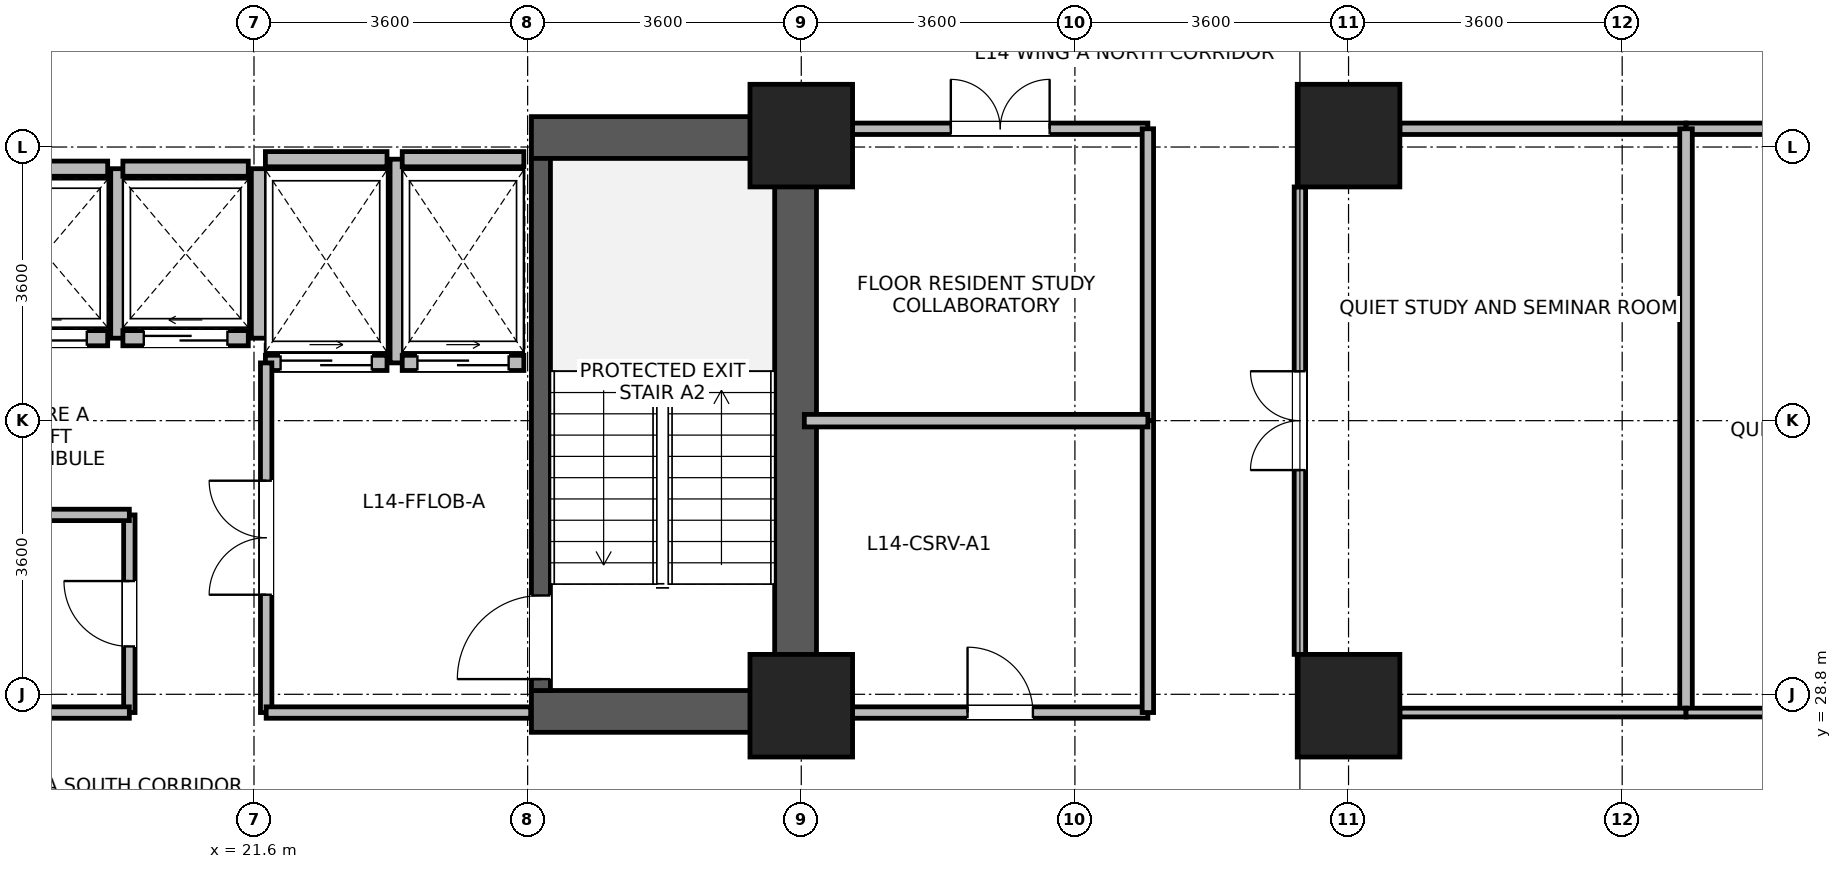
"""IFC4 building model, lengths in metres.
Left out: names, types, materials, properties, quantities, classifications, styles, units other than length and angle.
Written with IfcOpenShell. Run it as: python <this file> out.ifc"""

import sys

from ifc_helpers import new_model, si_unit, direction, frame, frame_2d, origin, origin_2d, place, context, subcontext, project, spatial, rectangle, extrude, source, transform, mapped, element, fill, save


model = new_model("IFC4")
c1 = context("Model", 3, precision=1e-05, world=origin(), true_north=direction((0.0, 1.0)))
c2 = subcontext(c1, "Body", "Model", "MODEL_VIEW")
j1 = project(units=[si_unit("LENGTHUNIT", "METRE"), si_unit("PLANEANGLEUNIT", "RADIAN")], contexts=[c1])
p1 = place(None, origin())
s1 = spatial("IfcSite", under=j1, at=p1, CompositionType="ELEMENT")
p2 = place(p1, origin())
s2 = spatial("IfcBuilding", under=s1, at=p2, CompositionType="ELEMENT")
p3 = place(p2, frame((0.0, 0.0, 58.6)))
s3 = spatial("IfcBuildingStorey", under=s2, at=p3, CompositionType="ELEMENT", Elevation=58.6)
p4 = place(p3, frame((28.725, 28.3, 0.0), z_axis=(0.0, 0.0, 1.0), x_axis=(0.0, 1.0, 0.0)))
e1 = element("IfcWall", 1, at=p4, inside=s3, PredefinedType="SHEAR", context=c2, shape_type="SweptSolid", body=[
    extrude(rectangle(XDim=8.1, YDim=0.55, at=frame_2d((4.05, 0.0))), origin(), (0.0, 0.0, 1.0), 3.45),
])
for number, where, z_axis, x_axis in (
    (2, (25.25, 28.575, 0.0), (0.0, 0.0, 1.0), (1.0, 0.0, 0.0)),
    (3, (25.25, 36.125, 0.0), (0.0, 0.0, 1.0), (1.0, 0.0, 0.0)),
):
    element("IfcWall", number, at=place(p3, frame(where, z_axis=z_axis, x_axis=x_axis)), inside=s3, PredefinedType="SHEAR", context=c2, shape_type="SweptSolid", body=[
        extrude(rectangle(XDim=3.2, YDim=0.55, at=frame_2d((1.6, 0.0))), origin(), (0.0, 0.0, 1.0), 3.45),
    ])
p5 = place(p3, frame((25.375, 28.85, 0.0), z_axis=(0.0, 0.0, 1.0), x_axis=(0.0, 1.0, 0.0)))
e4 = element("IfcWall", 4, at=p5, inside=s3, PredefinedType="SHEAR", context=c2, shape_type="SweptSolid", body=[
    extrude(rectangle(XDim=7.0, YDim=0.25, at=frame_2d((3.5, 0.0))), origin(), (0.0, 0.0, 1.0), 3.45),
])
p6 = place(p5, frame((0.15, 0.0, 0.0)))
e5 = element("IfcOpeningElement", 5, at=p6, cuts=e4, PredefinedType="OPENING", context=c2, shape_type="SweptSolid", body=[
    extrude(rectangle(XDim=1.1, YDim=2.08, at=frame_2d((0.55, 1.04))), frame((0.0, 0.135, 0.0), z_axis=(0.0, -1.0, 0.0), x_axis=(1.0, 0.0, 0.0)), (0.0, 0.0, 1.0), 0.27),
])
m1 = source(origin(), c2, "Body", "SweptSolid", [
    extrude(rectangle(XDim=1.35, YDim=1.35, at=origin_2d()), origin(), (0.0, 0.0, 1.0), 3.7),
])
for number, where, z_axis, x_axis in (
    (6, (28.8, 28.65, 0.0), (0.0, 0.0, 1.0), (1.0, 0.0, 0.0)),
    (7, (28.8, 36.15, 0.0), (0.0, 0.0, 1.0), (1.0, 0.0, 0.0)),
    (8, (36.0, 28.65, 0.0), (0.0, 0.0, 1.0), (1.0, 0.0, 0.0)),
    (9, (36.0, 36.15, 0.0), (0.0, 0.0, 1.0), (1.0, 0.0, 0.0)),
):
    element("IfcColumn", number, at=place(p3, frame(where, z_axis=z_axis, x_axis=x_axis)), inside=s3, PredefinedType="COLUMN", context=c2, shape_type="MappedRepresentation", body=[
        mapped(m1, transform((0.0, 0.0, 0.0), x_axis=(1.0, 0.0, 0.0), y_axis=(0.0, 1.0, 0.0), z_axis=(0.0, 0.0, 1.0), scale=1.0)),
    ])
p7 = place(p3, frame((18.025, 33.485, 0.0), z_axis=(0.0, 0.0, 1.0), x_axis=(1.0, 0.0, 0.0)))
e10 = element("IfcWall", 10, at=p7, inside=s3, PredefinedType="PARTITIONING", context=c2, shape_type="SweptSolid", body=[
    extrude(rectangle(XDim=1.65, YDim=0.2, at=frame_2d((0.825, 0.0))), origin(), (0.0, 0.0, 1.0), 3.43),
])
p8 = place(p7, frame((0.275, 0.0, 0.0)))
e11 = element("IfcOpeningElement", 11, at=p8, cuts=e10, PredefinedType="OPENING", context=c2, shape_type="SweptSolid", body=[
    extrude(rectangle(XDim=1.1, YDim=2.12, at=frame_2d((0.55, 1.06))), frame((0.0, 0.11, 0.0), z_axis=(0.0, -1.0, 0.0), x_axis=(1.0, 0.0, 0.0)), (0.0, 0.0, 1.0), 0.22),
])
p9 = place(p3, frame((18.025, 35.715, 0.0), z_axis=(0.0, 0.0, 1.0), x_axis=(1.0, 0.0, 0.0)))
e12 = element("IfcWall", 12, at=p9, inside=s3, PredefinedType="PARTITIONING", context=c2, shape_type="SweptSolid", body=[
    extrude(rectangle(XDim=1.65, YDim=0.2, at=frame_2d((0.825, 0.0))), origin(), (0.0, 0.0, 1.0), 2.23),
])
p10 = place(p3, frame((19.815, 33.485, 0.0), z_axis=(0.0, 0.0, 1.0), x_axis=(0.0, 1.0, 0.0)))
e13 = element("IfcWall", 13, at=p10, inside=s3, PredefinedType="PARTITIONING", context=c2, shape_type="SweptSolid", body=[
    extrude(rectangle(XDim=2.23, YDim=0.2, at=frame_2d((1.115, 0.0))), origin(), (0.0, 0.0, 1.0), 3.43),
])
p11 = place(p3, frame((19.875, 33.485, 0.0), z_axis=(0.0, 0.0, 1.0), x_axis=(1.0, 0.0, 0.0)))
e14 = element("IfcWall", 14, at=p11, inside=s3, PredefinedType="PARTITIONING", context=c2, shape_type="SweptSolid", body=[
    extrude(rectangle(XDim=1.65, YDim=0.2, at=frame_2d((0.825, 0.0))), origin(), (0.0, 0.0, 1.0), 3.43),
])
p12 = place(p11, frame((0.275, 0.0, 0.0)))
e15 = element("IfcOpeningElement", 15, at=p12, cuts=e14, PredefinedType="OPENING", context=c2, shape_type="SweptSolid", body=[
    extrude(rectangle(XDim=1.1, YDim=2.12, at=frame_2d((0.55, 1.06))), frame((0.0, 0.11, 0.0), z_axis=(0.0, -1.0, 0.0), x_axis=(1.0, 0.0, 0.0)), (0.0, 0.0, 1.0), 0.22),
])
p13 = place(p3, frame((19.875, 35.715, 0.0), z_axis=(0.0, 0.0, 1.0), x_axis=(1.0, 0.0, 0.0)))
e16 = element("IfcWall", 16, at=p13, inside=s3, PredefinedType="PARTITIONING", context=c2, shape_type="SweptSolid", body=[
    extrude(rectangle(XDim=1.65, YDim=0.2, at=frame_2d((0.825, 0.0))), origin(), (0.0, 0.0, 1.0), 2.23),
])
p14 = place(p3, frame((21.665, 33.485, 0.0), z_axis=(0.0, 0.0, 1.0), x_axis=(0.0, 1.0, 0.0)))
e17 = element("IfcWall", 17, at=p14, inside=s3, PredefinedType="PARTITIONING", context=c2, shape_type="SweptSolid", body=[
    extrude(rectangle(XDim=2.23, YDim=0.2, at=frame_2d((1.115, 0.0))), origin(), (0.0, 0.0, 1.0), 3.43),
])
p15 = place(p3, frame((21.75, 33.16, 0.0), z_axis=(0.0, 0.0, 1.0), x_axis=(1.0, 0.0, 0.0)))
e18 = element("IfcWall", 18, at=p15, inside=s3, PredefinedType="PARTITIONING", context=c2, shape_type="SweptSolid", body=[
    extrude(rectangle(XDim=1.6, YDim=0.2, at=frame_2d((0.8, 0.0))), origin(), (0.0, 0.0, 1.0), 3.43),
])
p16 = place(p15, frame((0.2, 0.0, 0.0)))
e19 = element("IfcOpeningElement", 19, at=p16, cuts=e18, PredefinedType="OPENING", context=c2, shape_type="SweptSolid", body=[
    extrude(rectangle(XDim=1.2, YDim=2.12, at=frame_2d((0.6, 1.06))), frame((0.0, 0.11, 0.0), z_axis=(0.0, -1.0, 0.0), x_axis=(1.0, 0.0, 0.0)), (0.0, 0.0, 1.0), 0.22),
])
p17 = place(p3, frame((21.75, 35.84, 0.0), z_axis=(0.0, 0.0, 1.0), x_axis=(1.0, 0.0, 0.0)))
e20 = element("IfcWall", 20, at=p17, inside=s3, PredefinedType="PARTITIONING", context=c2, shape_type="SweptSolid", body=[
    extrude(rectangle(XDim=1.6, YDim=0.2, at=frame_2d((0.8, 0.0))), origin(), (0.0, 0.0, 1.0), 2.23),
])
p18 = place(p3, frame((23.49, 33.16, 0.0), z_axis=(0.0, 0.0, 1.0), x_axis=(0.0, 1.0, 0.0)))
e21 = element("IfcWall", 21, at=p18, inside=s3, PredefinedType="PARTITIONING", context=c2, shape_type="SweptSolid", body=[
    extrude(rectangle(XDim=2.68, YDim=0.2, at=frame_2d((1.34, 0.0))), origin(), (0.0, 0.0, 1.0), 3.43),
])
p19 = place(p3, frame((23.55, 33.16, 0.0), z_axis=(0.0, 0.0, 1.0), x_axis=(1.0, 0.0, 0.0)))
e22 = element("IfcWall", 22, at=p19, inside=s3, PredefinedType="PARTITIONING", context=c2, shape_type="SweptSolid", body=[
    extrude(rectangle(XDim=1.6, YDim=0.2, at=frame_2d((0.8, 0.0))), origin(), (0.0, 0.0, 1.0), 3.43),
])
p20 = place(p19, frame((0.2, 0.0, 0.0)))
e23 = element("IfcOpeningElement", 23, at=p20, cuts=e22, PredefinedType="OPENING", context=c2, shape_type="SweptSolid", body=[
    extrude(rectangle(XDim=1.2, YDim=2.12, at=frame_2d((0.6, 1.06))), frame((0.0, 0.11, 0.0), z_axis=(0.0, -1.0, 0.0), x_axis=(1.0, 0.0, 0.0)), (0.0, 0.0, 1.0), 0.22),
])
p21 = place(p3, frame((23.55, 35.84, 0.0), z_axis=(0.0, 0.0, 1.0), x_axis=(1.0, 0.0, 0.0)))
e24 = element("IfcWall", 24, at=p21, inside=s3, PredefinedType="PARTITIONING", context=c2, shape_type="SweptSolid", body=[
    extrude(rectangle(XDim=1.6, YDim=0.2, at=frame_2d((0.8, 0.0))), origin(), (0.0, 0.0, 1.0), 2.23),
])
p22 = place(p3, frame((35.36, 29.325, 0.0), z_axis=(0.0, 0.0, 1.0), x_axis=(0.0, 1.0, 0.0)))
e25 = element("IfcWall", 25, at=p22, inside=s3, PredefinedType="PARTITIONING", context=c2, shape_type="SweptSolid", body=[
    extrude(rectangle(XDim=6.15, YDim=0.15, at=frame_2d((3.075, 0.0))), origin(), (0.0, 0.0, 1.0), 3.43),
])
p23 = place(p22, frame((2.425, 0.0, 0.0)))
e26 = element("IfcOpeningElement", 26, at=p23, cuts=e25, PredefinedType="OPENING", context=c2, shape_type="SweptSolid", body=[
    extrude(rectangle(XDim=1.3, YDim=2.12, at=frame_2d((0.65, 1.06))), frame((0.0, 0.085, 0.0), z_axis=(0.0, -1.0, 0.0), x_axis=(1.0, 0.0, 0.0)), (0.0, 0.0, 1.0), 0.17),
])
p24 = place(p3, frame((36.675, 36.24, 0.0), z_axis=(0.0, 0.0, 1.0), x_axis=(1.0, 0.0, 0.0)))
e27 = element("IfcWall", 27, at=p24, inside=s3, PredefinedType="PARTITIONING", context=c2, shape_type="SweptSolid", body=[
    extrude(rectangle(XDim=3.765, YDim=0.15, at=frame_2d((1.882, 0.0))), origin(), (0.0, 0.0, 1.0), 2.78),
])
p25 = place(p3, frame((40.44, 36.24, 0.0), z_axis=(0.0, 0.0, 1.0), x_axis=(1.0, 0.0, 0.0)))
e28 = element("IfcWall", 28, at=p25, inside=s3, PredefinedType="PARTITIONING", context=c2, shape_type="SweptSolid", body=[
    extrude(rectangle(XDim=4.72, YDim=0.15, at=frame_2d((2.36, 0.0))), origin(), (0.0, 0.0, 1.0), 2.78),
])
p26 = place(p25, frame((1.71, 0.0, 0.0)))
e29 = element("IfcOpeningElement", 29, at=p26, cuts=e28, PredefinedType="OPENING", context=c2, shape_type="SweptSolid", body=[
    extrude(rectangle(XDim=1.3, YDim=2.12, at=frame_2d((0.65, 1.06))), frame((0.0, 0.085, 0.0), z_axis=(0.0, -1.0, 0.0), x_axis=(1.0, 0.0, 0.0)), (0.0, 0.0, 1.0), 0.17),
])
p27 = place(p3, frame((29.475, 28.56, 0.0), z_axis=(0.0, 0.0, 1.0), x_axis=(1.0, 0.0, 0.0)))
e30 = element("IfcWall", 30, at=p27, inside=s3, PredefinedType="PARTITIONING", context=c2, shape_type="SweptSolid", body=[
    extrude(rectangle(XDim=3.885, YDim=0.15, at=frame_2d((1.942, 0.0))), origin(), (0.0, 0.0, 1.0), 2.78),
])
p28 = place(p27, frame((1.512, 0.0, 0.0)))
e31 = element("IfcOpeningElement", 31, at=p28, cuts=e30, PredefinedType="OPENING", context=c2, shape_type="SweptSolid", body=[
    extrude(rectangle(XDim=0.86, YDim=2.02, at=frame_2d((0.43, 1.01))), frame((0.0, 0.085, 0.0), z_axis=(0.0, -1.0, 0.0), x_axis=(1.0, 0.0, 0.0)), (0.0, 0.0, 1.0), 0.17),
])
p29 = place(p3, frame((29.475, 36.24, 0.0), z_axis=(0.0, 0.0, 1.0), x_axis=(1.0, 0.0, 0.0)))
e32 = element("IfcWall", 32, at=p29, inside=s3, PredefinedType="PARTITIONING", context=c2, shape_type="SweptSolid", body=[
    extrude(rectangle(XDim=3.885, YDim=0.15, at=frame_2d((1.942, 0.0))), origin(), (0.0, 0.0, 1.0), 2.78),
])
p30 = place(p29, frame((1.292, 0.0, 0.0)))
e33 = element("IfcOpeningElement", 33, at=p30, cuts=e32, PredefinedType="OPENING", context=c2, shape_type="SweptSolid", body=[
    extrude(rectangle(XDim=1.3, YDim=2.12, at=frame_2d((0.65, 1.06))), frame((0.0, 0.085, 0.0), z_axis=(0.0, -1.0, 0.0), x_axis=(1.0, 0.0, 0.0)), (0.0, 0.0, 1.0), 0.17),
])
p31 = place(p3, frame((33.36, 32.4, 0.0), z_axis=(0.0, 0.0, 1.0), x_axis=(0.0, 1.0, 0.0)))
e34 = element("IfcWall", 34, at=p31, inside=s3, PredefinedType="PARTITIONING", context=c2, shape_type="SweptSolid", body=[
    extrude(rectangle(XDim=3.84, YDim=0.15, at=frame_2d((1.92, 0.0))), origin(), (0.0, 0.0, 1.0), 3.43),
])
p32 = place(p3, frame((33.36, 28.56, 0.0), z_axis=(0.0, 0.0, 1.0), x_axis=(0.0, 1.0, 0.0)))
e35 = element("IfcWall", 35, at=p32, inside=s3, PredefinedType="PARTITIONING", context=c2, shape_type="SweptSolid", body=[
    extrude(rectangle(XDim=3.84, YDim=0.15, at=frame_2d((1.92, 0.0))), origin(), (0.0, 0.0, 1.0), 3.43),
])
p33 = place(p3, frame((19.96, 28.56, 0.0), z_axis=(0.0, 0.0, 1.0), x_axis=(0.0, 1.0, 0.0)))
e36 = element("IfcWall", 36, at=p33, inside=s3, PredefinedType="PARTITIONING", context=c2, shape_type="SweptSolid", body=[
    extrude(rectangle(XDim=2.6, YDim=0.15, at=frame_2d((1.3, 0.0))), origin(), (0.0, 0.0, 1.0), 3.43),
])
p34 = place(p33, frame((0.87, 0.0, 0.0)))
e37 = element("IfcOpeningElement", 37, at=p34, cuts=e36, PredefinedType="OPENING", context=c2, shape_type="SweptSolid", body=[
    extrude(rectangle(XDim=0.86, YDim=2.02, at=frame_2d((0.43, 1.01))), frame((0.0, 0.085, 0.0), z_axis=(0.0, -1.0, 0.0), x_axis=(1.0, 0.0, 0.0)), (0.0, 0.0, 1.0), 0.17),
])
p35 = place(p3, frame((17.96, 28.56, 0.0), z_axis=(0.0, 0.0, 1.0), x_axis=(1.0, 0.0, 0.0)))
e38 = element("IfcWall", 38, at=p35, inside=s3, PredefinedType="PARTITIONING", context=c2, shape_type="SweptSolid", body=[
    extrude(rectangle(XDim=2.0, YDim=0.15, at=frame_2d((1.0, 0.0))), origin(), (0.0, 0.0, 1.0), 2.23),
])
p36 = place(p3, frame((17.96, 31.16, 0.0), z_axis=(0.0, 0.0, 1.0), x_axis=(1.0, 0.0, 0.0)))
e39 = element("IfcWall", 39, at=p36, inside=s3, PredefinedType="PARTITIONING", context=c2, shape_type="SweptSolid", body=[
    extrude(rectangle(XDim=2.0, YDim=0.15, at=frame_2d((1.0, 0.0))), origin(), (0.0, 0.0, 1.0), 3.43),
])
p37 = place(p3, frame((40.44, 28.56, 0.0), z_axis=(0.0, 0.0, 1.0), x_axis=(0.0, 1.0, 0.0)))
e40 = element("IfcWall", 40, at=p37, inside=s3, PredefinedType="PARTITIONING", context=c2, shape_type="SweptSolid", body=[
    extrude(rectangle(XDim=7.68, YDim=0.165, at=frame_2d((3.84, 0.0))), origin(), (0.0, 0.0, 1.0), 3.43),
])
p38 = place(p3, frame((36.675, 28.56, 0.0), z_axis=(0.0, 0.0, 1.0), x_axis=(1.0, 0.0, 0.0)))
e41 = element("IfcWall", 41, at=p38, inside=s3, PredefinedType="PARTITIONING", context=c2, shape_type="SweptSolid", body=[
    extrude(rectangle(XDim=3.765, YDim=0.115, at=frame_2d((1.882, 0.0))), origin(), (0.0, 0.0, 1.0), 2.78),
])
p39 = place(p3, frame((40.44, 28.56, 0.0), z_axis=(0.0, 0.0, 1.0), x_axis=(1.0, 0.0, 0.0)))
e42 = element("IfcWall", 42, at=p39, inside=s3, PredefinedType="PARTITIONING", context=c2, shape_type="SweptSolid", body=[
    extrude(rectangle(XDim=4.72, YDim=0.115, at=frame_2d((2.36, 0.0))), origin(), (0.0, 0.0, 1.0), 2.78),
])
p40 = place(p3, frame((21.76, 28.56, 0.0), z_axis=(0.0, 0.0, 1.0), x_axis=(0.0, 1.0, 0.0)))
e43 = element("IfcWall", 43, at=p40, inside=s3, PredefinedType="PARTITIONING", context=c2, shape_type="SweptSolid", body=[
    extrude(rectangle(XDim=4.6, YDim=0.15, at=frame_2d((2.3, 0.0))), origin(), (0.0, 0.0, 1.0), 3.43),
])
p41 = place(p40, frame((1.55, 0.0, 0.0)))
e44 = element("IfcOpeningElement", 44, at=p41, cuts=e43, PredefinedType="OPENING", context=c2, shape_type="SweptSolid", body=[
    extrude(rectangle(XDim=1.5, YDim=2.1, at=frame_2d((0.75, 1.05))), frame((0.0, 0.085, 0.0), z_axis=(0.0, -1.0, 0.0), x_axis=(1.0, 0.0, 0.0)), (0.0, 0.0, 1.0), 0.17),
])
p42 = place(p3, frame((28.84, 32.4, 0.0), z_axis=(0.0, 0.0, 1.0), x_axis=(1.0, 0.0, 0.0)))
e45 = element("IfcWall", 45, at=p42, inside=s3, PredefinedType="PARTITIONING", context=c2, shape_type="SweptSolid", body=[
    extrude(rectangle(XDim=4.52, YDim=0.165, at=frame_2d((2.26, 0.0))), origin(), (0.0, 0.0, 1.0), 3.43),
])
p43 = place(p3, frame((21.76, 28.56, 0.0), z_axis=(0.0, 0.0, 1.0), x_axis=(1.0, 0.0, 0.0)))
e46 = element("IfcWall", 46, at=p43, inside=s3, PredefinedType="PARTITIONING", context=c2, shape_type="SweptSolid", body=[
    extrude(rectangle(XDim=3.48, YDim=0.15, at=frame_2d((1.74, 0.0))), origin(), (0.0, 0.0, 1.0), 2.23),
])
p44 = place(p6, origin())
e47 = element("IfcDoor", 47, at=p44, inside=s3, OperationType="SINGLE_SWING_LEFT", PredefinedType="DOOR", context=c2, shape_type="SweptSolid", body=[
    extrude(rectangle(XDim=1.1, YDim=2.08, at=frame_2d((0.55, 1.04))), frame((0.0, 0.025, 0.0), z_axis=(0.0, -1.0, 0.0), x_axis=(1.0, 0.0, 0.0)), (0.0, 0.0, 1.0), 0.05),
])
fill(e5, e47)
p45 = place(p8, origin())
e48 = element("IfcDoor", 48, at=p45, inside=s3, OperationType="SLIDING_TO_LEFT", PredefinedType="DOOR", context=c2, shape_type="SweptSolid", body=[
    extrude(rectangle(XDim=1.1, YDim=2.12, at=frame_2d((0.55, 1.06))), frame((0.0, 0.025, 0.0), z_axis=(0.0, -1.0, 0.0), x_axis=(1.0, 0.0, 0.0)), (0.0, 0.0, 1.0), 0.05),
])
fill(e11, e48)
p46 = place(p12, origin())
e49 = element("IfcDoor", 49, at=p46, inside=s3, OperationType="SLIDING_TO_LEFT", PredefinedType="DOOR", context=c2, shape_type="SweptSolid", body=[
    extrude(rectangle(XDim=1.1, YDim=2.12, at=frame_2d((0.55, 1.06))), frame((0.0, 0.025, 0.0), z_axis=(0.0, -1.0, 0.0), x_axis=(1.0, 0.0, 0.0)), (0.0, 0.0, 1.0), 0.05),
])
fill(e15, e49)
p47 = place(p16, origin())
e50 = element("IfcDoor", 50, at=p47, inside=s3, OperationType="SLIDING_TO_RIGHT", PredefinedType="DOOR", context=c2, shape_type="SweptSolid", body=[
    extrude(rectangle(XDim=1.2, YDim=2.12, at=frame_2d((0.6, 1.06))), frame((0.0, 0.025, 0.0), z_axis=(0.0, -1.0, 0.0), x_axis=(1.0, 0.0, 0.0)), (0.0, 0.0, 1.0), 0.05),
])
fill(e19, e50)
p48 = place(p20, origin())
e51 = element("IfcDoor", 51, at=p48, inside=s3, OperationType="SLIDING_TO_RIGHT", PredefinedType="DOOR", context=c2, shape_type="SweptSolid", body=[
    extrude(rectangle(XDim=1.2, YDim=2.12, at=frame_2d((0.6, 1.06))), frame((0.0, 0.025, 0.0), z_axis=(0.0, -1.0, 0.0), x_axis=(1.0, 0.0, 0.0)), (0.0, 0.0, 1.0), 0.05),
])
fill(e23, e51)
p49 = place(p23, origin())
e52 = element("IfcDoor", 52, at=p49, inside=s3, OperationType="DOUBLE_DOOR_SINGLE_SWING", PredefinedType="DOOR", context=c2, shape_type="SweptSolid", body=[
    extrude(rectangle(XDim=1.3, YDim=2.12, at=frame_2d((0.65, 1.06))), frame((0.0, 0.025, 0.0), z_axis=(0.0, -1.0, 0.0), x_axis=(1.0, 0.0, 0.0)), (0.0, 0.0, 1.0), 0.05),
])
fill(e26, e52)
p50 = place(p28, origin())
e53 = element("IfcDoor", 53, at=p50, inside=s3, OperationType="SINGLE_SWING_LEFT", PredefinedType="DOOR", context=c2, shape_type="SweptSolid", body=[
    extrude(rectangle(XDim=0.86, YDim=2.02, at=frame_2d((0.43, 1.01))), frame((0.0, 0.025, 0.0), z_axis=(0.0, -1.0, 0.0), x_axis=(1.0, 0.0, 0.0)), (0.0, 0.0, 1.0), 0.05),
])
fill(e31, e53)
p51 = place(p30, origin())
e54 = element("IfcDoor", 54, at=p51, inside=s3, OperationType="DOUBLE_DOOR_SINGLE_SWING", PredefinedType="DOOR", context=c2, shape_type="SweptSolid", body=[
    extrude(rectangle(XDim=1.3, YDim=2.12, at=frame_2d((0.65, 1.06))), frame((0.0, 0.025, 0.0), z_axis=(0.0, -1.0, 0.0), x_axis=(1.0, 0.0, 0.0)), (0.0, 0.0, 1.0), 0.05),
])
fill(e33, e54)
p52 = place(p34, origin())
e55 = element("IfcDoor", 55, at=p52, inside=s3, OperationType="SINGLE_SWING_RIGHT", PredefinedType="DOOR", context=c2, shape_type="SweptSolid", body=[
    extrude(rectangle(XDim=0.86, YDim=2.02, at=frame_2d((0.43, 1.01))), frame((0.0, 0.025, 0.0), z_axis=(0.0, -1.0, 0.0), x_axis=(1.0, 0.0, 0.0)), (0.0, 0.0, 1.0), 0.05),
])
fill(e37, e55)
p53 = place(p41, origin())
e56 = element("IfcDoor", 56, at=p53, inside=s3, OperationType="DOUBLE_DOOR_SINGLE_SWING", PredefinedType="DOOR", context=c2, shape_type="SweptSolid", body=[
    extrude(rectangle(XDim=1.5, YDim=2.1, at=frame_2d((0.75, 1.05))), frame((0.0, 0.025, 0.0), z_axis=(0.0, -1.0, 0.0), x_axis=(1.0, 0.0, 0.0)), (0.0, 0.0, 1.0), 0.05),
])
fill(e44, e56)
save(model, sys.argv[1])
